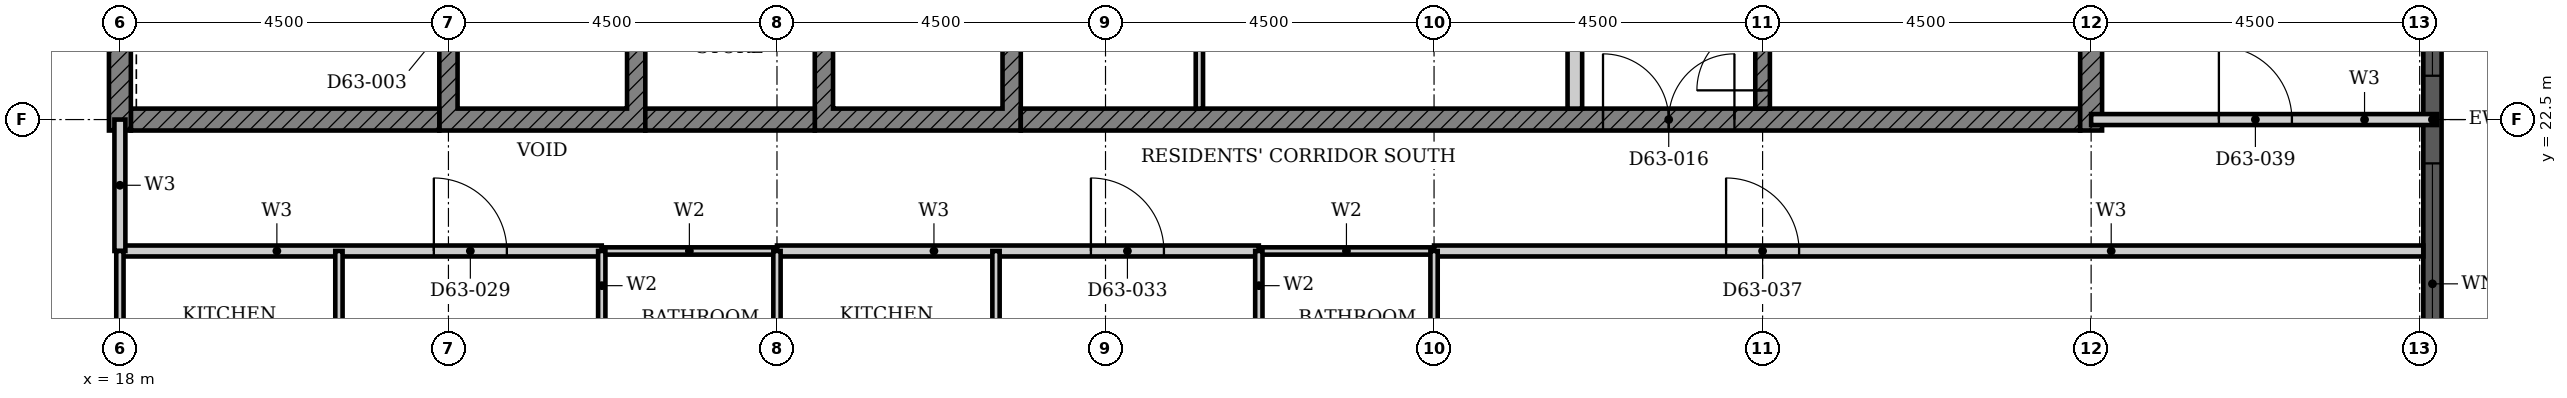
"""IFC4 building model, lengths in metres.
Left out: names, types, materials, properties, quantities, classifications, styles, units other than length and angle.
Written with IfcOpenShell. Run it as: python <this file> out.ifc"""

import sys

from ifc_helpers import new_model, si_unit, direction, frame, frame_2d, origin, place, context, subcontext, project, spatial, polyline, rectangle, outline, extrude, element, fill, save


model = new_model("IFC4")
c1 = context("Model", 3, precision=1e-05, world=origin(), true_north=direction((0.0, 1.0)))
c2 = subcontext(c1, "Body", "Model", "MODEL_VIEW")
j1 = project(units=[si_unit("LENGTHUNIT", "METRE"), si_unit("PLANEANGLEUNIT", "RADIAN")], contexts=[c1])
p1 = place(None, origin())
s1 = spatial("IfcSite", under=j1, at=p1, CompositionType="ELEMENT")
p2 = place(p1, origin())
s2 = spatial("IfcBuilding", under=s1, at=p2, CompositionType="ELEMENT")
p3 = place(p2, frame((0.0, 0.0, 249.0)))
s3 = spatial("IfcBuildingStorey", under=s2, at=p3, CompositionType="ELEMENT", Elevation=249.0)
p4 = place(p3, frame((49.675, 18.3, 0.0), z_axis=(0.0, 0.0, 1.0), x_axis=(0.0, 1.0, 0.0)))
e1 = element("IfcWall", 1, at=p4, inside=s3, PredefinedType="SOLIDWALL", context=c2, shape_type="SweptSolid", body=[
    extrude(rectangle(XDim=8.4, YDim=0.25, at=frame_2d((4.2, 0.0))), origin(), (0.0, 0.0, 1.0), 3.7),
])
p5 = place(p4, frame((0.3, 0.0, 0.45)))
e2 = element("IfcOpeningElement", 2, at=p5, cuts=e1, PredefinedType="OPENING", context=c2, shape_type="SweptSolid", body=[
    extrude(rectangle(XDim=3.3, YDim=2.3, at=frame_2d((1.65, 1.15))), frame((0.0, 0.135, 0.0), z_axis=(0.0, -1.0, 0.0), x_axis=(1.0, 0.0, 0.0)), (0.0, 0.0, 1.0), 0.27),
])
p6 = place(p4, frame((4.8, 0.0, 0.45)))
e3 = element("IfcOpeningElement", 3, at=p6, cuts=e1, PredefinedType="OPENING", context=c2, shape_type="SweptSolid", body=[
    extrude(rectangle(XDim=3.3, YDim=2.3, at=frame_2d((1.65, 1.15))), frame((0.0, 0.135, 0.0), z_axis=(0.0, -1.0, 0.0), x_axis=(1.0, 0.0, 0.0)), (0.0, 0.0, 1.0), 0.27),
])
p7 = place(p3, origin())
e4 = element("IfcWall", 4, at=p7, inside=s3, PredefinedType="SHEAR", context=c2, shape_type="SweptSolid", body=[
    extrude(outline(polyline([(22.375, 22.35), (25.197, 22.35), (25.197, 25.275), (24.947, 25.275), (24.947, 22.65), (22.625, 22.65), (22.625, 25.275), (22.375, 25.275), (22.375, 22.35)])), origin(), (0.0, 0.0, 1.0), 3.4),
])
p8 = place(p3, origin())
e5 = element("IfcWall", 5, at=p8, inside=s3, PredefinedType="SHEAR", context=c2, shape_type="SweptSolid", body=[
    extrude(outline(polyline([(27.518, 22.35), (30.339, 22.35), (30.339, 25.275), (30.089, 25.275), (30.089, 22.65), (27.768, 22.65), (27.768, 25.275), (27.518, 25.275), (27.518, 22.35)])), origin(), (0.0, 0.0, 1.0), 3.4),
])
p9 = place(p3, frame((18.15, 22.5, 0.0), z_axis=(0.0, 0.0, 1.0), x_axis=(1.0, 0.0, 0.0)))
e6 = element("IfcWall", 6, at=p9, inside=s3, PredefinedType="SHEAR", context=c2, shape_type="SweptSolid", body=[
    extrude(rectangle(XDim=4.225, YDim=0.3, at=frame_2d((2.113, 0.0))), origin(), (0.0, 0.0, 1.0), 3.4),
])
p10 = place(p3, frame((25.197, 22.5, 0.0), z_axis=(0.0, 0.0, 1.0), x_axis=(1.0, 0.0, 0.0)))
e7 = element("IfcWall", 7, at=p10, inside=s3, PredefinedType="SHEAR", context=c2, shape_type="SweptSolid", body=[
    extrude(rectangle(XDim=2.321, YDim=0.3, at=frame_2d((1.161, 0.0))), origin(), (0.0, 0.0, 1.0), 3.4),
])
p11 = place(p3, frame((30.339, 22.5, 0.0), z_axis=(0.0, 0.0, 1.0), x_axis=(1.0, 0.0, 0.0)))
e8 = element("IfcWall", 8, at=p11, inside=s3, PredefinedType="SHEAR", context=c2, shape_type="SweptSolid", body=[
    extrude(rectangle(XDim=14.511, YDim=0.3, at=frame_2d((7.255, 0.0))), origin(), (0.0, 0.0, 1.0), 3.4),
])
p12 = place(p11, frame((7.975, 0.0, 0.0)))
e9 = element("IfcOpeningElement", 9, at=p12, cuts=e8, PredefinedType="OPENING", context=c2, shape_type="SweptSolid", body=[
    extrude(rectangle(XDim=1.8, YDim=2.1, at=frame_2d((0.9, 1.05))), frame((0.0, 0.16, 0.0), z_axis=(0.0, -1.0, 0.0), x_axis=(1.0, 0.0, 0.0)), (0.0, 0.0, 1.0), 0.32),
])
for number, where, z_axis, x_axis in (
    (10, (18.0, 22.35, 0.0), (0.0, 0.0, 1.0), (0.0, 1.0, 0.0)),
    (11, (45.0, 22.35, 0.0), (0.0, 0.0, 1.0), (0.0, 1.0, 0.0)),
):
    element("IfcWall", number, at=place(p3, frame(where, z_axis=z_axis, x_axis=x_axis)), inside=s3, PredefinedType="SHEAR", context=c2, shape_type="SweptSolid", body=[
        extrude(rectangle(XDim=9.3, YDim=0.3, at=frame_2d((4.65, 0.0))), origin(), (0.0, 0.0, 1.0), 3.4),
    ])
p13 = place(p3, frame((37.928, 22.65, 0.0), z_axis=(0.0, 0.0, 1.0), x_axis=(0.0, 1.0, 0.0)))
e12 = element("IfcWall", 12, at=p13, inside=s3, PredefinedType="PARTITIONING", context=c2, shape_type="SweptSolid", body=[
    extrude(rectangle(XDim=2.625, YDim=0.2, at=frame_2d((1.312, 0.0))), origin(), (0.0, 0.0, 1.0), 3.4),
])
p14 = place(p3, frame((32.786, 22.65, 0.0), z_axis=(0.0, 0.0, 1.0), x_axis=(0.0, 1.0, 0.0)))
e13 = element("IfcWall", 13, at=p14, inside=s3, PredefinedType="PARTITIONING", context=c2, shape_type="SweptSolid", body=[
    extrude(rectangle(XDim=2.625, YDim=0.1, at=frame_2d((1.312, 0.0))), origin(), (0.0, 0.0, 1.0), 3.4),
])
p15 = place(p3, frame((40.5, 22.65, 0.0), z_axis=(0.0, 0.0, 1.0), x_axis=(0.0, 1.0, 0.0)))
e14 = element("IfcWall", 14, at=p15, inside=s3, PredefinedType="SHEAR", context=c2, shape_type="SweptSolid", body=[
    extrude(rectangle(XDim=5.825, YDim=0.2, at=frame_2d((2.913, 0.0))), origin(), (0.0, 0.0, 1.0), 3.4),
])
p16 = place(p15, frame((0.25, 0.0, 0.0)))
e15 = element("IfcOpeningElement", 15, at=p16, cuts=e14, PredefinedType="OPENING", context=c2, shape_type="SweptSolid", body=[
    extrude(rectangle(XDim=1.8, YDim=2.1, at=frame_2d((0.9, 1.05))), frame((0.0, 0.11, 0.0), z_axis=(0.0, -1.0, 0.0), x_axis=(1.0, 0.0, 0.0)), (0.0, 0.0, 1.0), 0.22),
])
p17 = place(p3, frame((18.0, 20.7, 0.0), z_axis=(0.0, 0.0, 1.0), x_axis=(1.0, 0.0, 0.0)))
e16 = element("IfcWall", 16, at=p17, inside=s3, PredefinedType="PARTITIONING", context=c2, shape_type="SweptSolid", body=[
    extrude(rectangle(XDim=6.6, YDim=0.15, at=frame_2d((3.3, 0.0))), origin(), (0.0, 0.0, 1.0), 3.4),
])
p18 = place(p17, frame((4.3, 0.0, 0.0)))
e17 = element("IfcOpeningElement", 17, at=p18, cuts=e16, PredefinedType="OPENING", context=c2, shape_type="SweptSolid", body=[
    extrude(rectangle(XDim=1.0, YDim=2.2, at=frame_2d((0.5, 1.1))), frame((0.0, 0.085, 0.0), z_axis=(0.0, -1.0, 0.0), x_axis=(1.0, 0.0, 0.0)), (0.0, 0.0, 1.0), 0.17),
])
p19 = place(p3, frame((27.0, 20.7, 0.0), z_axis=(0.0, 0.0, 1.0), x_axis=(1.0, 0.0, 0.0)))
e18 = element("IfcWall", 18, at=p19, inside=s3, PredefinedType="PARTITIONING", context=c2, shape_type="SweptSolid", body=[
    extrude(rectangle(XDim=6.6, YDim=0.15, at=frame_2d((3.3, 0.0))), origin(), (0.0, 0.0, 1.0), 3.4),
])
p20 = place(p19, frame((4.3, 0.0, 0.0)))
e19 = element("IfcOpeningElement", 19, at=p20, cuts=e18, PredefinedType="OPENING", context=c2, shape_type="SweptSolid", body=[
    extrude(rectangle(XDim=1.0, YDim=2.2, at=frame_2d((0.5, 1.1))), frame((0.0, 0.085, 0.0), z_axis=(0.0, -1.0, 0.0), x_axis=(1.0, 0.0, 0.0)), (0.0, 0.0, 1.0), 0.17),
])
p21 = place(p3, frame((36.0, 20.7, 0.0), z_axis=(0.0, 0.0, 1.0), x_axis=(1.0, 0.0, 0.0)))
e20 = element("IfcWall", 20, at=p21, inside=s3, PredefinedType="PARTITIONING", context=c2, shape_type="SweptSolid", body=[
    extrude(rectangle(XDim=13.55, YDim=0.15, at=frame_2d((6.775, 0.0))), origin(), (0.0, 0.0, 1.0), 3.4),
])
p22 = place(p21, frame((4.0, 0.0, 0.0)))
e21 = element("IfcOpeningElement", 21, at=p22, cuts=e20, PredefinedType="OPENING", context=c2, shape_type="SweptSolid", body=[
    extrude(rectangle(XDim=1.0, YDim=2.1, at=frame_2d((0.5, 1.05))), frame((0.0, 0.085, 0.0), z_axis=(0.0, -1.0, 0.0), x_axis=(1.0, 0.0, 0.0)), (0.0, 0.0, 1.0), 0.17),
])
p23 = place(p3, frame((45.0, 22.5, 0.0), z_axis=(0.0, 0.0, 1.0), x_axis=(1.0, 0.0, 0.0)))
e22 = element("IfcWall", 22, at=p23, inside=s3, PredefinedType="PARTITIONING", context=c2, shape_type="SweptSolid", body=[
    extrude(rectangle(XDim=4.74, YDim=0.15, at=frame_2d((2.37, 0.0))), origin(), (0.0, 0.0, 1.0), 3.4),
])
p24 = place(p23, frame((1.75, 0.0, 0.0)))
e23 = element("IfcOpeningElement", 23, at=p24, cuts=e22, PredefinedType="OPENING", context=c2, shape_type="SweptSolid", body=[
    extrude(rectangle(XDim=1.0, YDim=2.1, at=frame_2d((0.5, 1.05))), frame((0.0, 0.085, 0.0), z_axis=(0.0, -1.0, 0.0), x_axis=(1.0, 0.0, 0.0)), (0.0, 0.0, 1.0), 0.17),
])
p25 = place(p3, frame((18.0, 20.7, 0.0), z_axis=(0.0, 0.0, 1.0), x_axis=(0.0, 1.0, 0.0)))
e24 = element("IfcWall", 24, at=p25, inside=s3, PredefinedType="PARTITIONING", context=c2, shape_type="SweptSolid", body=[
    extrude(rectangle(XDim=1.8, YDim=0.15, at=frame_2d((0.9, 0.0))), origin(), (0.0, 0.0, 1.0), 3.4),
])
for number, where, z_axis, x_axis in (
    (25, (18.0, 18.0, 0.0), (0.0, 0.0, 1.0), (0.0, 1.0, 0.0)),
    (26, (21.0, 18.0, 0.0), (0.0, 0.0, 1.0), (0.0, 1.0, 0.0)),
    (27, (30.0, 18.0, 0.0), (0.0, 0.0, 1.0), (0.0, 1.0, 0.0)),
):
    element("IfcWall", number, at=place(p3, frame(where, z_axis=z_axis, x_axis=x_axis)), inside=s3, PredefinedType="PARTITIONING", context=c2, shape_type="SweptSolid", body=[
        extrude(rectangle(XDim=2.7, YDim=0.1, at=frame_2d((1.35, 0.0))), origin(), (0.0, 0.0, 1.0), 3.4),
    ])
for number, where, z_axis, x_axis in (
    (28, (24.6, 20.7, 0.0), (0.0, 0.0, 1.0), (1.0, 0.0, 0.0)),
    (29, (33.6, 20.7, 0.0), (0.0, 0.0, 1.0), (1.0, 0.0, 0.0)),
):
    element("IfcWall", number, at=place(p3, frame(where, z_axis=z_axis, x_axis=x_axis)), inside=s3, PredefinedType="PARTITIONING", context=c2, shape_type="SweptSolid", body=[
        extrude(rectangle(XDim=2.4, YDim=0.1, at=frame_2d((1.2, 0.0))), origin(), (0.0, 0.0, 1.0), 3.4),
    ])
p26 = place(p3, frame((24.6, 18.0, 0.0), z_axis=(0.0, 0.0, 1.0), x_axis=(0.0, 1.0, 0.0)))
e30 = element("IfcWall", 30, at=p26, inside=s3, PredefinedType="PARTITIONING", context=c2, shape_type="SweptSolid", body=[
    extrude(rectangle(XDim=2.7, YDim=0.1, at=frame_2d((1.35, 0.0))), origin(), (0.0, 0.0, 1.0), 3.4),
])
p27 = place(p26, frame((0.95, 0.0, 0.0)))
e31 = element("IfcOpeningElement", 31, at=p27, cuts=e30, PredefinedType="OPENING", context=c2, shape_type="SweptSolid", body=[
    extrude(rectangle(XDim=0.8, YDim=2.1, at=frame_2d((0.4, 1.05))), frame((0.0, 0.06, 0.0), z_axis=(0.0, -1.0, 0.0), x_axis=(1.0, 0.0, 0.0)), (0.0, 0.0, 1.0), 0.12),
])
p28 = place(p3, frame((27.0, 18.0, 0.0), z_axis=(0.0, 0.0, 1.0), x_axis=(0.0, 1.0, 0.0)))
e32 = element("IfcWall", 32, at=p28, inside=s3, PredefinedType="PARTITIONING", context=c2, shape_type="SweptSolid", body=[
    extrude(rectangle(XDim=2.7, YDim=0.1, at=frame_2d((1.35, 0.0))), origin(), (0.0, 0.0, 1.0), 3.4),
])
p29 = place(p3, frame((33.6, 18.0, 0.0), z_axis=(0.0, 0.0, 1.0), x_axis=(0.0, 1.0, 0.0)))
e33 = element("IfcWall", 33, at=p29, inside=s3, PredefinedType="PARTITIONING", context=c2, shape_type="SweptSolid", body=[
    extrude(rectangle(XDim=2.7, YDim=0.1, at=frame_2d((1.35, 0.0))), origin(), (0.0, 0.0, 1.0), 3.4),
])
p30 = place(p29, frame((0.95, 0.0, 0.0)))
e34 = element("IfcOpeningElement", 34, at=p30, cuts=e33, PredefinedType="OPENING", context=c2, shape_type="SweptSolid", body=[
    extrude(rectangle(XDim=0.8, YDim=2.1, at=frame_2d((0.4, 1.05))), frame((0.0, 0.06, 0.0), z_axis=(0.0, -1.0, 0.0), x_axis=(1.0, 0.0, 0.0)), (0.0, 0.0, 1.0), 0.12),
])
p31 = place(p3, frame((36.0, 18.0, 0.0), z_axis=(0.0, 0.0, 1.0), x_axis=(0.0, 1.0, 0.0)))
e35 = element("IfcWall", 35, at=p31, inside=s3, PredefinedType="PARTITIONING", context=c2, shape_type="SweptSolid", body=[
    extrude(rectangle(XDim=2.7, YDim=0.1, at=frame_2d((1.35, 0.0))), origin(), (0.0, 0.0, 1.0), 3.4),
])
p32 = place(p5, origin())
e36 = element("IfcWindow", 36, at=p32, inside=s3, PartitioningType="SINGLE_PANEL", PredefinedType="WINDOW", context=c2, shape_type="SweptSolid", body=[
    extrude(rectangle(XDim=3.3, YDim=2.3, at=frame_2d((1.65, 1.15))), frame((0.0, 0.03, 0.0), z_axis=(0.0, -1.0, 0.0), x_axis=(1.0, 0.0, 0.0)), (0.0, 0.0, 1.0), 0.06),
])
fill(e2, e36)
p33 = place(p6, origin())
e37 = element("IfcWindow", 37, at=p33, inside=s3, PartitioningType="SINGLE_PANEL", PredefinedType="WINDOW", context=c2, shape_type="SweptSolid", body=[
    extrude(rectangle(XDim=3.3, YDim=2.3, at=frame_2d((1.65, 1.15))), frame((0.0, 0.03, 0.0), z_axis=(0.0, -1.0, 0.0), x_axis=(1.0, 0.0, 0.0)), (0.0, 0.0, 1.0), 0.06),
])
fill(e3, e37)
p34 = place(p16, origin())
e38 = element("IfcDoor", 38, at=p34, inside=s3, OperationType="DOUBLE_DOOR_SINGLE_SWING", PredefinedType="DOOR", context=c2, shape_type="SweptSolid", body=[
    extrude(rectangle(XDim=1.8, YDim=2.1, at=frame_2d((0.9, 1.05))), frame((0.0, 0.025, 0.0), z_axis=(0.0, -1.0, 0.0), x_axis=(1.0, 0.0, 0.0)), (0.0, 0.0, 1.0), 0.05),
])
fill(e15, e38)
p35 = place(p12, origin())
e39 = element("IfcDoor", 39, at=p35, inside=s3, OperationType="DOUBLE_DOOR_SINGLE_SWING", PredefinedType="DOOR", context=c2, shape_type="SweptSolid", body=[
    extrude(rectangle(XDim=1.8, YDim=2.1, at=frame_2d((0.9, 1.05))), frame((0.0, 0.025, 0.0), z_axis=(0.0, -1.0, 0.0), x_axis=(1.0, 0.0, 0.0)), (0.0, 0.0, 1.0), 0.05),
])
fill(e9, e39)
p36 = place(p18, origin())
e40 = element("IfcDoor", 40, at=p36, inside=s3, OperationType="SINGLE_SWING_LEFT", PredefinedType="DOOR", context=c2, shape_type="SweptSolid", body=[
    extrude(rectangle(XDim=1.0, YDim=2.2, at=frame_2d((0.5, 1.1))), frame((0.0, 0.025, 0.0), z_axis=(0.0, -1.0, 0.0), x_axis=(1.0, 0.0, 0.0)), (0.0, 0.0, 1.0), 0.05),
])
fill(e17, e40)
p37 = place(p20, origin())
e41 = element("IfcDoor", 41, at=p37, inside=s3, OperationType="SINGLE_SWING_LEFT", PredefinedType="DOOR", context=c2, shape_type="SweptSolid", body=[
    extrude(rectangle(XDim=1.0, YDim=2.2, at=frame_2d((0.5, 1.1))), frame((0.0, 0.025, 0.0), z_axis=(0.0, -1.0, 0.0), x_axis=(1.0, 0.0, 0.0)), (0.0, 0.0, 1.0), 0.05),
])
fill(e19, e41)
p38 = place(p22, origin())
e42 = element("IfcDoor", 42, at=p38, inside=s3, OperationType="SINGLE_SWING_RIGHT", PredefinedType="DOOR", context=c2, shape_type="SweptSolid", body=[
    extrude(rectangle(XDim=1.0, YDim=2.1, at=frame_2d((0.5, 1.05))), frame((0.0, 0.025, 0.0), z_axis=(0.0, -1.0, 0.0), x_axis=(1.0, 0.0, 0.0)), (0.0, 0.0, 1.0), 0.05),
])
fill(e21, e42)
p39 = place(p24, origin())
e43 = element("IfcDoor", 43, at=p39, inside=s3, OperationType="SINGLE_SWING_LEFT", PredefinedType="DOOR", context=c2, shape_type="SweptSolid", body=[
    extrude(rectangle(XDim=1.0, YDim=2.1, at=frame_2d((0.5, 1.05))), frame((0.0, 0.025, 0.0), z_axis=(0.0, -1.0, 0.0), x_axis=(1.0, 0.0, 0.0)), (0.0, 0.0, 1.0), 0.05),
])
fill(e23, e43)
save(model, sys.argv[1])
